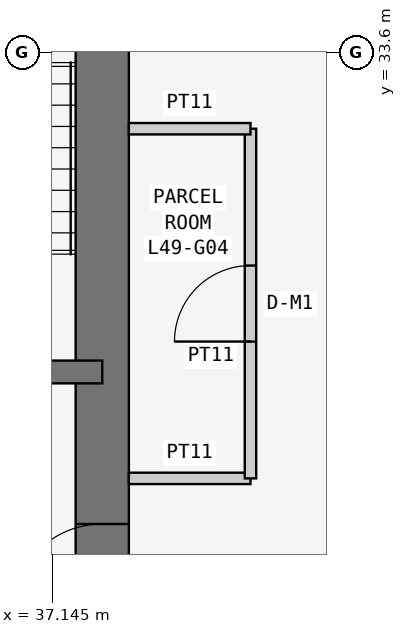
"""IFC4 building model, lengths in metres.
Left out: names, types, materials, properties, quantities, classifications, styles, units other than length and angle.
Written with IfcOpenShell. Run it as: python <this file> out.ifc"""

import sys

from ifc_helpers import new_model, si_unit, direction, frame, frame_2d, origin, place, context, subcontext, project, spatial, rectangle, extrude, element, fill, save


model = new_model("IFC4")
c1 = context("Model", 3, precision=1e-05, world=origin(), true_north=direction((0.0, 1.0)))
c2 = subcontext(c1, "Body", "Model", "MODEL_VIEW")
j1 = project(units=[si_unit("LENGTHUNIT", "METRE"), si_unit("PLANEANGLEUNIT", "RADIAN")], contexts=[c1])
p1 = place(None, origin())
s1 = spatial("IfcSite", under=j1, at=p1, CompositionType="ELEMENT")
p2 = place(p1, origin())
s2 = spatial("IfcBuilding", under=s1, at=p2, CompositionType="ELEMENT")
p3 = place(p2, frame((0.0, 0.0, 190.5)))
s3 = spatial("IfcBuildingStorey", under=s2, at=p3, CompositionType="ELEMENT", Elevation=190.5)
p4 = place(p3, frame((37.8, 21.0, 0.0), z_axis=(0.0, 0.0, 1.0), x_axis=(0.0, 1.0, 0.0)))
e1 = element("IfcWall", 1, at=p4, inside=s3, PredefinedType="SHEAR", context=c2, shape_type="SweptSolid", body=[
    extrude(rectangle(XDim=17.15, YDim=0.7, at=frame_2d((8.575, 0.0))), origin(), (0.0, 0.0, 1.0), 3.6),
])
p5 = place(p4, frame((5.2, 0.0, 0.0)))
e2 = element("IfcOpeningElement", 2, at=p5, cuts=e1, PredefinedType="OPENING", context=c2, shape_type="SweptSolid", body=[
    extrude(rectangle(XDim=1.2, YDim=2.1, at=frame_2d((0.6, 1.05))), frame((0.0, 0.36, 0.0), z_axis=(0.0, -1.0, 0.0), x_axis=(1.0, 0.0, 0.0)), (0.0, 0.0, 1.0), 0.72),
])
p6 = place(p3, frame((32.2, 29.4, 0.0), z_axis=(0.0, 0.0, 1.0), x_axis=(1.0, 0.0, 0.0)))
e3 = element("IfcWall", 3, at=p6, inside=s3, PredefinedType="SHEAR", context=c2, shape_type="SweptSolid", body=[
    extrude(rectangle(XDim=5.6, YDim=0.3, at=frame_2d((2.8, 0.0))), origin(), (0.0, 0.0, 1.0), 3.6),
])
p7 = place(p6, frame((2.0, 0.0, 0.0)))
e4 = element("IfcOpeningElement", 4, at=p7, cuts=e3, PredefinedType="OPENING", context=c2, shape_type="SweptSolid", body=[
    extrude(rectangle(XDim=1.2, YDim=2.1, at=frame_2d((0.6, 1.05))), frame((0.0, 0.16, 0.0), z_axis=(0.0, -1.0, 0.0), x_axis=(1.0, 0.0, 0.0)), (0.0, 0.0, 1.0), 0.32),
])
p8 = place(p3, frame((38.15, 28.0, 0.0), z_axis=(0.0, 0.0, 1.0), x_axis=(1.0, 0.0, 0.0)))
e5 = element("IfcWall", 5, at=p8, inside=s3, PredefinedType="PARTITIONING", context=c2, shape_type="SweptSolid", body=[
    extrude(rectangle(XDim=1.6, YDim=0.15, at=frame_2d((0.8, 0.0))), origin(), (0.0, 0.0, 1.0), 3.45),
])
p9 = place(p3, frame((39.75, 28.0, 0.0), z_axis=(0.0, 0.0, 1.0), x_axis=(0.0, 1.0, 0.0)))
e6 = element("IfcWall", 6, at=p9, inside=s3, PredefinedType="PARTITIONING", context=c2, shape_type="SweptSolid", body=[
    extrude(rectangle(XDim=4.6, YDim=0.15, at=frame_2d((2.3, 0.0))), origin(), (0.0, 0.0, 1.0), 3.45),
])
p10 = place(p9, frame((1.8, 0.0, 0.0)))
e7 = element("IfcOpeningElement", 7, at=p10, cuts=e6, PredefinedType="OPENING", context=c2, shape_type="SweptSolid", body=[
    extrude(rectangle(XDim=1.0, YDim=2.1, at=frame_2d((0.5, 1.05))), frame((0.0, 0.085, 0.0), z_axis=(0.0, -1.0, 0.0), x_axis=(1.0, 0.0, 0.0)), (0.0, 0.0, 1.0), 0.17),
])
p11 = place(p3, frame((39.75, 32.6, 0.0), z_axis=(0.0, 0.0, 1.0), x_axis=(-1.0, 0.0, 0.0)))
e8 = element("IfcWall", 8, at=p11, inside=s3, PredefinedType="PARTITIONING", context=c2, shape_type="SweptSolid", body=[
    extrude(rectangle(XDim=1.6, YDim=0.15, at=frame_2d((0.8, 0.0))), origin(), (0.0, 0.0, 1.0), 3.45),
])
p12 = place(p10, origin())
e9 = element("IfcDoor", 9, at=p12, inside=s3, OperationType="SINGLE_SWING_LEFT", PredefinedType="DOOR", context=c2, shape_type="SweptSolid", body=[
    extrude(rectangle(XDim=1.0, YDim=2.1, at=frame_2d((0.5, 1.05))), frame((0.0, 0.025, 0.0), z_axis=(0.0, -1.0, 0.0), x_axis=(1.0, 0.0, 0.0)), (0.0, 0.0, 1.0), 0.05),
])
fill(e7, e9)
p13 = place(p5, origin())
e10 = element("IfcDoor", 10, at=p13, inside=s3, OperationType="SINGLE_SWING_LEFT", PredefinedType="DOOR", context=c2, shape_type="SweptSolid", body=[
    extrude(rectangle(XDim=1.2, YDim=2.1, at=frame_2d((0.6, 1.05))), frame((0.0, 0.025, 0.0), z_axis=(0.0, -1.0, 0.0), x_axis=(1.0, 0.0, 0.0)), (0.0, 0.0, 1.0), 0.05),
])
fill(e2, e10)
save(model, sys.argv[1])
